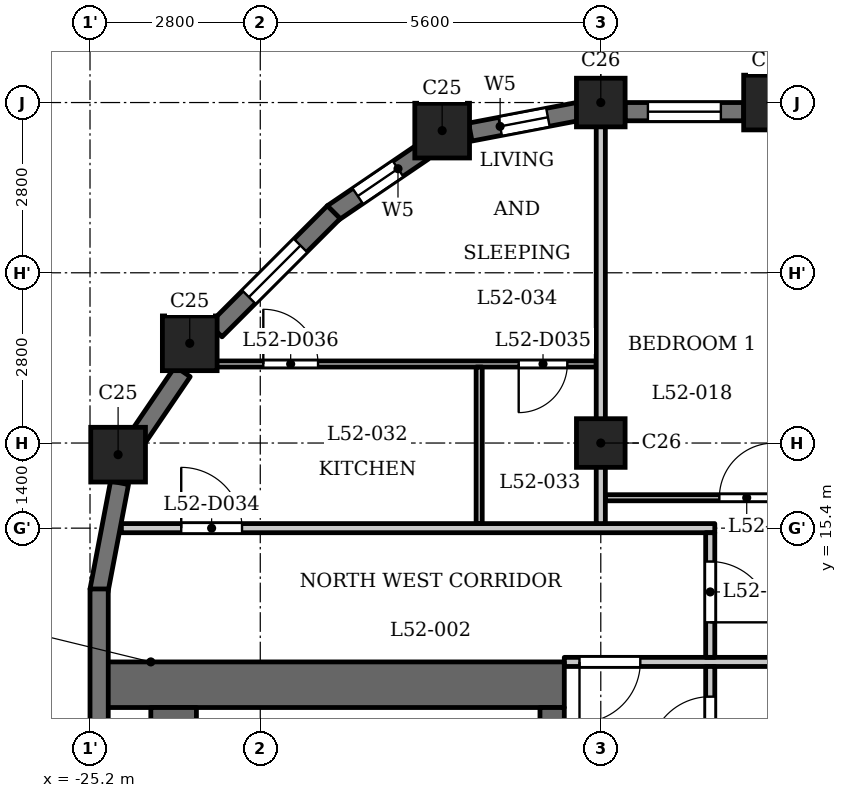
"""IFC4 building model, lengths in metres.
Left out: names, types, materials, properties, quantities, classifications, styles, units other than length and angle.
Written with IfcOpenShell. Run it as: python <this file> out.ifc"""

import sys

from ifc_helpers import new_model, si_unit, direction, frame, frame_2d, origin, origin_2d, place, context, subcontext, project, spatial, rectangle, extrude, element, fill, save


model = new_model("IFC4")
c1 = context("Model", 3, precision=1e-05, world=origin(), true_north=direction((0.0, 1.0)))
c2 = subcontext(c1, "Body", "Model", "MODEL_VIEW")
j1 = project(units=[si_unit("LENGTHUNIT", "METRE"), si_unit("PLANEANGLEUNIT", "RADIAN")], contexts=[c1])
p1 = place(None, origin())
s1 = spatial("IfcSite", under=j1, at=p1, CompositionType="ELEMENT")
p2 = place(p1, origin())
s2 = spatial("IfcBuilding", under=s1, at=p2, CompositionType="ELEMENT")
p3 = place(p2, frame((0.0, 0.0, 202.9)))
s3 = spatial("IfcBuildingStorey", under=s2, at=p3, CompositionType="ELEMENT", Elevation=202.9)
for number, where, z_axis, x_axis in (
    (1, (-14.0, 22.4, 0.0), (0.0, 0.0, 1.0), (1.0, 0.0, 0.0)),
    (2, (-19.409, 21.938, 0.0), (0.0, 0.0, 1.0), (1.0, 0.0, 0.0)),
    (3, (-23.56, 18.44, 0.0), (0.0, 0.0, 1.0), (1.0, 0.0, 0.0)),
    (4, (-24.738, 16.609, 0.0), (0.0, 0.0, 1.0), (1.0, 0.0, 0.0)),
):
    element("IfcColumn", number, at=place(p3, frame(where, z_axis=z_axis, x_axis=x_axis)), inside=s3, PredefinedType="COLUMN", context=c2, shape_type="SweptSolid", body=[
        extrude(rectangle(XDim=0.9, YDim=0.9, at=origin_2d()), origin(), (0.0, 0.0, 1.0), 3.5),
    ])
for number, where, z_axis, x_axis in (
    (5, (-16.8, 16.8, 0.0), (0.0, 0.0, 1.0), (1.0, 0.0, 0.0)),
    (6, (-16.8, 22.4, 0.0), (0.0, 0.0, 1.0), (1.0, 0.0, 0.0)),
):
    element("IfcColumn", number, at=place(p3, frame(where, z_axis=z_axis, x_axis=x_axis)), inside=s3, PredefinedType="COLUMN", context=c2, shape_type="SweptSolid", body=[
        extrude(rectangle(XDim=0.8, YDim=0.8, at=origin_2d()), origin(), (0.0, 0.0, 1.0), 3.5),
    ])
p4 = place(p3, frame((-14.45, 22.25, 0.0), z_axis=(0.0, 0.0, 1.0), x_axis=(-1.0, 0.0, 0.0)))
e7 = element("IfcWall", 7, at=p4, inside=s3, PredefinedType="SOLIDWALL", context=c2, shape_type="SweptSolid", body=[
    extrude(rectangle(XDim=1.95, YDim=0.3, at=frame_2d((0.975, 0.0))), origin(), (0.0, 0.0, 1.0), 2.5),
])
p5 = place(p4, frame((0.375, 0.0, 0.6)))
e8 = element("IfcOpeningElement", 8, at=p5, cuts=e7, PredefinedType="OPENING", context=c2, shape_type="SweptSolid", body=[
    extrude(rectangle(XDim=1.2, YDim=1.55, at=frame_2d((0.6, 0.775))), frame((0.0, 0.16, 0.0), z_axis=(0.0, -1.0, 0.0), x_axis=(1.0, 0.0, 0.0)), (0.0, 0.0, 1.0), 0.32),
])
p6 = place(p3, frame((-17.179, 22.251, 0.0), z_axis=(0.0, 0.0, 1.0), x_axis=(-0.98230529033, -0.187286722942, 0.0)))
e9 = element("IfcWall", 9, at=p6, inside=s3, PredefinedType="SOLIDWALL", context=c2, shape_type="SweptSolid", body=[
    extrude(rectangle(XDim=1.799, YDim=0.3, at=frame_2d((0.899, 0.0))), origin(), (0.0, 0.0, 1.0), 2.5),
])
p7 = place(p6, frame((0.5, 0.0, 0.6)))
e10 = element("IfcOpeningElement", 10, at=p7, cuts=e9, PredefinedType="OPENING", context=c2, shape_type="SweptSolid", body=[
    extrude(rectangle(XDim=0.8, YDim=1.55, at=frame_2d((0.4, 0.775))), frame((0.0, 0.16, 0.0), z_axis=(0.0, -1.0, 0.0), x_axis=(1.0, 0.0, 0.0)), (0.0, 0.0, 1.0), 0.32),
])
p8 = place(p3, frame((-19.719, 21.594, 0.0), z_axis=(0.0, 0.0, 1.0), x_axis=(-0.827067282455, -0.562102935673, 0.0)))
e11 = element("IfcWall", 11, at=p8, inside=s3, PredefinedType="SOLIDWALL", context=c2, shape_type="SweptSolid", body=[
    extrude(rectangle(XDim=1.806, YDim=0.3, at=frame_2d((0.903, 0.0))), origin(), (0.0, 0.0, 1.0), 2.5),
])
p9 = place(p8, frame((0.503, 0.0, 0.6)))
e12 = element("IfcOpeningElement", 12, at=p9, cuts=e11, PredefinedType="OPENING", context=c2, shape_type="SweptSolid", body=[
    extrude(rectangle(XDim=0.8, YDim=1.55, at=frame_2d((0.4, 0.775))), frame((0.0, 0.16, 0.0), z_axis=(0.0, -1.0, 0.0), x_axis=(1.0, 0.0, 0.0)), (0.0, 0.0, 1.0), 0.32),
])
p10 = place(p3, frame((-21.191, 20.597, 0.0), z_axis=(0.0, 0.0, 1.0), x_axis=(-0.707106781187, -0.707106781187, 0.0)))
e13 = element("IfcWall", 13, at=p10, inside=s3, PredefinedType="SOLIDWALL", context=c2, shape_type="SweptSolid", body=[
    extrude(rectangle(XDim=2.75, YDim=0.3, at=frame_2d((1.375, 0.0))), origin(), (0.0, 0.0, 1.0), 2.5),
])
p11 = place(p10, frame((0.775, 0.0, 0.6)))
e14 = element("IfcOpeningElement", 14, at=p11, cuts=e13, PredefinedType="OPENING", context=c2, shape_type="SweptSolid", body=[
    extrude(rectangle(XDim=1.2, YDim=1.55, at=frame_2d((0.6, 0.775))), frame((0.0, 0.16, 0.0), z_axis=(0.0, -1.0, 0.0), x_axis=(1.0, 0.0, 0.0)), (0.0, 0.0, 1.0), 0.32),
])
p12 = place(p3, frame((-23.676, 17.975, 0.0), z_axis=(0.0, 0.0, 1.0), x_axis=(-0.56200149592, -0.827136215253, 0.0)))
e15 = element("IfcWall", 15, at=p12, inside=s3, PredefinedType="SOLIDWALL", context=c2, shape_type="SweptSolid", body=[
    extrude(rectangle(XDim=1.277, YDim=0.3, at=frame_2d((0.639, 0.0))), origin(), (0.0, 0.0, 1.0), 2.5),
])
p13 = place(p3, frame((-24.714, 16.146, 0.0), z_axis=(0.0, 0.0, 1.0), x_axis=(-0.187348135549, -0.982293579388, 0.0)))
e16 = element("IfcWall", 16, at=p13, inside=s3, PredefinedType="SOLIDWALL", context=c2, shape_type="SweptSolid", body=[
    extrude(rectangle(XDim=1.806, YDim=0.3, at=frame_2d((0.903, 0.0))), origin(), (0.0, 0.0, 1.0), 2.5),
])
p14 = place(p3, frame((-25.05, 14.4, 0.0), z_axis=(0.0, 0.0, 1.0), x_axis=(0.0, -1.0, 0.0)))
e17 = element("IfcWall", 17, at=p14, inside=s3, PredefinedType="SOLIDWALL", context=c2, shape_type="SweptSolid", body=[
    extrude(rectangle(XDim=2.75, YDim=0.3, at=frame_2d((1.375, 0.0))), origin(), (0.0, 0.0, 1.0), 2.5),
])
p15 = place(p3, frame((-17.4, 12.825, 0.0), z_axis=(0.0, 0.0, 1.0), x_axis=(-1.0, 0.0, 0.0)))
e18 = element("IfcWall", 18, at=p15, inside=s3, PredefinedType="SHEAR", context=c2, shape_type="SweptSolid", body=[
    extrude(rectangle(XDim=7.6, YDim=0.75, at=frame_2d((3.8, 0.0))), origin(), (0.0, 0.0, 1.0), 3.2),
])
p16 = place(p3, frame((-17.6, -12.45, 0.0), z_axis=(0.0, 0.0, 1.0), x_axis=(0.0, 1.0, 0.0)))
e19 = element("IfcWall", 19, at=p16, inside=s3, PredefinedType="SHEAR", context=c2, shape_type="SweptSolid", body=[
    extrude(rectangle(XDim=24.9, YDim=0.4, at=frame_2d((12.45, 0.0))), origin(), (0.0, 0.0, 1.0), 3.2),
])
p17 = place(p16, frame((8.65, 0.0, 0.0)))
e20 = element("IfcOpeningElement", 20, at=p17, cuts=e19, PredefinedType="OPENING", context=c2, shape_type="SweptSolid", body=[
    extrude(rectangle(XDim=0.9, YDim=2.1, at=frame_2d((0.45, 1.05))), frame((0.0, 0.21, 0.0), z_axis=(0.0, -1.0, 0.0), x_axis=(1.0, 0.0, 0.0)), (0.0, 0.0, 1.0), 0.42),
])
p18 = place(p16, frame((15.6, 0.0, 0.0)))
e21 = element("IfcOpeningElement", 21, at=p18, cuts=e19, PredefinedType="OPENING", context=c2, shape_type="SweptSolid", body=[
    extrude(rectangle(XDim=1.1, YDim=2.1, at=frame_2d((0.55, 1.05))), frame((0.0, 0.21, 0.0), z_axis=(0.0, -1.0, 0.0), x_axis=(1.0, 0.0, 0.0)), (0.0, 0.0, 1.0), 0.42),
])
p19 = place(p16, frame((18.0, 0.0, 0.0)))
e22 = element("IfcOpeningElement", 22, at=p19, cuts=e19, PredefinedType="OPENING", context=c2, shape_type="SweptSolid", body=[
    extrude(rectangle(XDim=1.1, YDim=2.1, at=frame_2d((0.55, 1.05))), frame((0.0, 0.21, 0.0), z_axis=(0.0, -1.0, 0.0), x_axis=(1.0, 0.0, 0.0)), (0.0, 0.0, 1.0), 0.42),
])
p20 = place(p16, frame((23.025, 0.0, 0.0)))
e23 = element("IfcOpeningElement", 23, at=p20, cuts=e19, PredefinedType="OPENING", context=c2, shape_type="SweptSolid", body=[
    extrude(rectangle(XDim=1.1, YDim=2.1, at=frame_2d((0.55, 1.05))), frame((0.0, 0.21, 0.0), z_axis=(0.0, -1.0, 0.0), x_axis=(1.0, 0.0, 0.0)), (0.0, 0.0, 1.0), 0.42),
])
p21 = place(p16, frame((0.775, 0.0, 0.0)))
e24 = element("IfcOpeningElement", 24, at=p21, cuts=e19, PredefinedType="OPENING", context=c2, shape_type="SweptSolid", body=[
    extrude(rectangle(XDim=1.1, YDim=2.1, at=frame_2d((0.55, 1.05))), frame((0.0, 0.21, 0.0), z_axis=(0.0, -1.0, 0.0), x_axis=(1.0, 0.0, 0.0)), (0.0, 0.0, 1.0), 0.42),
])
p22 = place(p16, frame((12.925, 0.0, 0.0)))
e25 = element("IfcOpeningElement", 25, at=p22, cuts=e19, PredefinedType="OPENING", context=c2, shape_type="SweptSolid", body=[
    extrude(rectangle(XDim=1.8, YDim=2.1, at=frame_2d((0.9, 1.05))), frame((0.0, 0.21, 0.0), z_axis=(0.0, -1.0, 0.0), x_axis=(1.0, 0.0, 0.0)), (0.0, 0.0, 1.0), 0.42),
])
p23 = place(p3, frame((-23.825, -12.45, 0.0), z_axis=(0.0, 0.0, 1.0), x_axis=(0.0, 1.0, 0.0)))
e26 = element("IfcWall", 26, at=p23, inside=s3, PredefinedType="SHEAR", context=c2, shape_type="SweptSolid", body=[
    extrude(rectangle(XDim=24.9, YDim=0.75, at=frame_2d((12.45, 0.0))), origin(), (0.0, 0.0, 1.0), 3.2),
])
p24 = place(p3, frame((-17.4, 13.2, 0.0), z_axis=(0.0, 0.0, 1.0), x_axis=(1.0, 0.0, 0.0)))
e27 = element("IfcWall", 27, at=p24, inside=s3, PredefinedType="PARTITIONING", context=c2, shape_type="SweptSolid", body=[
    extrude(rectangle(XDim=34.8, YDim=0.15, at=frame_2d((17.4, 0.0))), origin(), (0.0, 0.0, 1.0), 3.2),
])
p25 = place(p24, frame((0.25, 0.0, 0.0)))
e28 = element("IfcOpeningElement", 28, at=p25, cuts=e27, PredefinedType="OPENING", context=c2, shape_type="SweptSolid", body=[
    extrude(rectangle(XDim=1.0, YDim=2.1, at=frame_2d((0.5, 1.05))), frame((0.0, 0.085, 0.0), z_axis=(0.0, -1.0, 0.0), x_axis=(1.0, 0.0, 0.0)), (0.0, 0.0, 1.0), 0.17),
])
p26 = place(p24, frame((33.65, 0.0, 0.0)))
e29 = element("IfcOpeningElement", 29, at=p26, cuts=e27, PredefinedType="OPENING", context=c2, shape_type="SweptSolid", body=[
    extrude(rectangle(XDim=1.0, YDim=2.1, at=frame_2d((0.5, 1.05))), frame((0.0, 0.085, 0.0), z_axis=(0.0, -1.0, 0.0), x_axis=(1.0, 0.0, 0.0)), (0.0, 0.0, 1.0), 0.17),
])
p27 = place(p3, frame((-24.684, 15.4, 0.0), z_axis=(0.0, 0.0, 1.0), x_axis=(1.0, 0.0, 0.0)))
e30 = element("IfcWall", 30, at=p27, inside=s3, PredefinedType="PARTITIONING", context=c2, shape_type="SweptSolid", body=[
    extrude(rectangle(XDim=9.759, YDim=0.15, at=frame_2d((4.879, 0.0))), origin(), (0.0, 0.0, 1.0), 3.2),
])
p28 = place(p27, frame((0.984, 0.0, 0.0)))
e31 = element("IfcOpeningElement", 31, at=p28, cuts=e30, PredefinedType="OPENING", context=c2, shape_type="SweptSolid", body=[
    extrude(rectangle(XDim=1.0, YDim=2.1, at=frame_2d((0.5, 1.05))), frame((0.0, 0.085, 0.0), z_axis=(0.0, -1.0, 0.0), x_axis=(1.0, 0.0, 0.0)), (0.0, 0.0, 1.0), 0.17),
])
p29 = place(p3, frame((-16.725, 15.9, 0.0), z_axis=(0.0, 0.0, 1.0), x_axis=(1.0, 0.0, 0.0)))
e32 = element("IfcWall", 32, at=p29, inside=s3, PredefinedType="PARTITIONING", context=c2, shape_type="SweptSolid", body=[
    extrude(rectangle(XDim=33.45, YDim=0.1, at=frame_2d((16.725, 0.0))), origin(), (0.0, 0.0, 1.0), 3.2),
])
p30 = place(p29, frame((1.875, 0.0, 0.0)))
e33 = element("IfcOpeningElement", 33, at=p30, cuts=e32, PredefinedType="OPENING", context=c2, shape_type="SweptSolid", body=[
    extrude(rectangle(XDim=0.9, YDim=2.1, at=frame_2d((0.45, 1.05))), frame((0.0, 0.06, 0.0), z_axis=(0.0, -1.0, 0.0), x_axis=(1.0, 0.0, 0.0)), (0.0, 0.0, 1.0), 0.12),
])
p31 = place(p29, frame((3.975, 0.0, 0.0)))
e34 = element("IfcOpeningElement", 34, at=p31, cuts=e32, PredefinedType="OPENING", context=c2, shape_type="SweptSolid", body=[
    extrude(rectangle(XDim=0.9, YDim=2.1, at=frame_2d((0.45, 1.05))), frame((0.0, 0.06, 0.0), z_axis=(0.0, -1.0, 0.0), x_axis=(1.0, 0.0, 0.0)), (0.0, 0.0, 1.0), 0.12),
])
p32 = place(p29, frame((6.825, 0.0, 0.0)))
e35 = element("IfcOpeningElement", 35, at=p32, cuts=e32, PredefinedType="OPENING", context=c2, shape_type="SweptSolid", body=[
    extrude(rectangle(XDim=0.9, YDim=2.1, at=frame_2d((0.45, 1.05))), frame((0.0, 0.06, 0.0), z_axis=(0.0, -1.0, 0.0), x_axis=(1.0, 0.0, 0.0)), (0.0, 0.0, 1.0), 0.12),
])
p33 = place(p29, frame((28.975, 0.0, 0.0)))
e36 = element("IfcOpeningElement", 36, at=p33, cuts=e32, PredefinedType="OPENING", context=c2, shape_type="SweptSolid", body=[
    extrude(rectangle(XDim=0.9, YDim=2.1, at=frame_2d((0.45, 1.05))), frame((0.0, 0.06, 0.0), z_axis=(0.0, -1.0, 0.0), x_axis=(1.0, 0.0, 0.0)), (0.0, 0.0, 1.0), 0.12),
])
p34 = place(p29, frame((30.725, 0.0, 0.0)))
e37 = element("IfcOpeningElement", 37, at=p34, cuts=e32, PredefinedType="OPENING", context=c2, shape_type="SweptSolid", body=[
    extrude(rectangle(XDim=0.9, YDim=2.1, at=frame_2d((0.45, 1.05))), frame((0.0, 0.06, 0.0), z_axis=(0.0, -1.0, 0.0), x_axis=(1.0, 0.0, 0.0)), (0.0, 0.0, 1.0), 0.12),
])
p35 = place(p29, frame((25.625, 0.0, 0.0)))
e38 = element("IfcOpeningElement", 38, at=p35, cuts=e32, PredefinedType="OPENING", context=c2, shape_type="SweptSolid", body=[
    extrude(rectangle(XDim=0.9, YDim=2.1, at=frame_2d((0.45, 1.05))), frame((0.0, 0.06, 0.0), z_axis=(0.0, -1.0, 0.0), x_axis=(1.0, 0.0, 0.0)), (0.0, 0.0, 1.0), 0.12),
])
p36 = place(p3, frame((-23.64, 18.1, 0.0), z_axis=(0.0, 0.0, 1.0), x_axis=(1.0, 0.0, 0.0)))
e39 = element("IfcWall", 39, at=p36, inside=s3, PredefinedType="PARTITIONING", context=c2, shape_type="SweptSolid", body=[
    extrude(rectangle(XDim=6.765, YDim=0.1, at=frame_2d((3.382, 0.0))), origin(), (0.0, 0.0, 1.0), 3.2),
])
p37 = place(p36, frame((5.49, 0.0, 0.0)))
e40 = element("IfcOpeningElement", 40, at=p37, cuts=e39, PredefinedType="OPENING", context=c2, shape_type="SweptSolid", body=[
    extrude(rectangle(XDim=0.8, YDim=2.1, at=frame_2d((0.4, 1.05))), frame((0.0, 0.06, 0.0), z_axis=(0.0, -1.0, 0.0), x_axis=(1.0, 0.0, 0.0)), (0.0, 0.0, 1.0), 0.12),
])
p38 = place(p36, frame((1.29, 0.0, 0.0)))
e41 = element("IfcOpeningElement", 41, at=p38, cuts=e39, PredefinedType="OPENING", context=c2, shape_type="SweptSolid", body=[
    extrude(rectangle(XDim=0.9, YDim=2.1, at=frame_2d((0.45, 1.05))), frame((0.0, 0.06, 0.0), z_axis=(0.0, -1.0, 0.0), x_axis=(1.0, 0.0, 0.0)), (0.0, 0.0, 1.0), 0.12),
])
p39 = place(p3, frame((-18.8, 15.475, 0.0), z_axis=(0.0, 0.0, 1.0), x_axis=(0.0, 1.0, 0.0)))
e42 = element("IfcWall", 42, at=p39, inside=s3, PredefinedType="PARTITIONING", context=c2, shape_type="SweptSolid", body=[
    extrude(rectangle(XDim=2.575, YDim=0.1, at=frame_2d((1.288, 0.0))), origin(), (0.0, 0.0, 1.0), 3.2),
])
p40 = place(p3, frame((-16.8, 15.475, 0.0), z_axis=(0.0, 0.0, 1.0), x_axis=(0.0, 1.0, 0.0)))
e43 = element("IfcWall", 43, at=p40, inside=s3, PredefinedType="PARTITIONING", context=c2, shape_type="SweptSolid", body=[
    extrude(rectangle(XDim=6.835, YDim=0.15, at=frame_2d((3.417, 0.0))), origin(), (0.0, 0.0, 1.0), 2.55),
])
p41 = place(p3, frame((-15.0, 6.769, 0.0), z_axis=(0.0, 0.0, 1.0), x_axis=(0.0, 1.0, 0.0)))
e44 = element("IfcWall", 44, at=p41, inside=s3, PredefinedType="PARTITIONING", context=c2, shape_type="SweptSolid", body=[
    extrude(rectangle(XDim=6.356, YDim=0.15, at=frame_2d((3.178, 0.0))), origin(), (0.0, 0.0, 1.0), 3.2),
])
p42 = place(p41, frame((4.86, 0.0, 0.0)))
e45 = element("IfcOpeningElement", 45, at=p42, cuts=e44, PredefinedType="OPENING", context=c2, shape_type="SweptSolid", body=[
    extrude(rectangle(XDim=1.0, YDim=2.1, at=frame_2d((0.5, 1.05))), frame((0.0, 0.085, 0.0), z_axis=(0.0, -1.0, 0.0), x_axis=(1.0, 0.0, 0.0)), (0.0, 0.0, 1.0), 0.17),
])
p43 = place(p3, frame((-15.0, 13.275, 0.0), z_axis=(0.0, 0.0, 1.0), x_axis=(0.0, 1.0, 0.0)))
e46 = element("IfcWall", 46, at=p43, inside=s3, PredefinedType="PARTITIONING", context=c2, shape_type="SweptSolid", body=[
    extrude(rectangle(XDim=2.05, YDim=0.15, at=frame_2d((1.025, 0.0))), origin(), (0.0, 0.0, 1.0), 3.2),
])
p44 = place(p43, frame((0.576, 0.0, 0.0)))
e47 = element("IfcOpeningElement", 47, at=p44, cuts=e46, PredefinedType="OPENING", context=c2, shape_type="SweptSolid", body=[
    extrude(rectangle(XDim=1.0, YDim=2.1, at=frame_2d((0.5, 1.05))), frame((0.0, 0.085, 0.0), z_axis=(0.0, -1.0, 0.0), x_axis=(1.0, 0.0, 0.0)), (0.0, 0.0, 1.0), 0.17),
])
p45 = place(p42, origin())
e48 = element("IfcDoor", 48, at=p45, inside=s3, OperationType="SINGLE_SWING_RIGHT", PredefinedType="DOOR", context=c2, shape_type="SweptSolid", body=[
    extrude(rectangle(XDim=1.0, YDim=2.1, at=frame_2d((0.5, 1.05))), frame((0.0, 0.025, 0.0), z_axis=(0.0, -1.0, 0.0), x_axis=(1.0, 0.0, 0.0)), (0.0, 0.0, 1.0), 0.05),
])
fill(e45, e48)
p46 = place(p25, origin())
e49 = element("IfcDoor", 49, at=p46, inside=s3, OperationType="SINGLE_SWING_LEFT", PredefinedType="DOOR", context=c2, shape_type="SweptSolid", body=[
    extrude(rectangle(XDim=1.0, YDim=2.1, at=frame_2d((0.5, 1.05))), frame((0.0, 0.025, 0.0), z_axis=(0.0, -1.0, 0.0), x_axis=(1.0, 0.0, 0.0)), (0.0, 0.0, 1.0), 0.05),
])
fill(e28, e49)
p47 = place(p44, origin())
e50 = element("IfcDoor", 50, at=p47, inside=s3, OperationType="SINGLE_SWING_LEFT", PredefinedType="DOOR", context=c2, shape_type="SweptSolid", body=[
    extrude(rectangle(XDim=1.0, YDim=2.1, at=frame_2d((0.5, 1.05))), frame((0.0, 0.025, 0.0), z_axis=(0.0, -1.0, 0.0), x_axis=(1.0, 0.0, 0.0)), (0.0, 0.0, 1.0), 0.05),
])
fill(e47, e50)
p48 = place(p30, origin())
e51 = element("IfcDoor", 51, at=p48, inside=s3, OperationType="SINGLE_SWING_LEFT", PredefinedType="DOOR", context=c2, shape_type="SweptSolid", body=[
    extrude(rectangle(XDim=0.9, YDim=2.1, at=frame_2d((0.45, 1.05))), frame((0.0, 0.025, 0.0), z_axis=(0.0, -1.0, 0.0), x_axis=(1.0, 0.0, 0.0)), (0.0, 0.0, 1.0), 0.05),
])
fill(e33, e51)
p49 = place(p28, origin())
e52 = element("IfcDoor", 52, at=p49, inside=s3, OperationType="SINGLE_SWING_RIGHT", PredefinedType="DOOR", context=c2, shape_type="SweptSolid", body=[
    extrude(rectangle(XDim=1.0, YDim=2.1, at=frame_2d((0.5, 1.05))), frame((0.0, 0.025, 0.0), z_axis=(0.0, -1.0, 0.0), x_axis=(1.0, 0.0, 0.0)), (0.0, 0.0, 1.0), 0.05),
])
fill(e31, e52)
p50 = place(p37, origin())
e53 = element("IfcDoor", 53, at=p50, inside=s3, OperationType="SINGLE_SWING_LEFT", PredefinedType="DOOR", context=c2, shape_type="SweptSolid", body=[
    extrude(rectangle(XDim=0.8, YDim=2.1, at=frame_2d((0.4, 1.05))), frame((0.0, 0.025, 0.0), z_axis=(0.0, -1.0, 0.0), x_axis=(1.0, 0.0, 0.0)), (0.0, 0.0, 1.0), 0.05),
])
fill(e40, e53)
p51 = place(p38, origin())
e54 = element("IfcDoor", 54, at=p51, inside=s3, OperationType="SINGLE_SWING_RIGHT", PredefinedType="DOOR", context=c2, shape_type="SweptSolid", body=[
    extrude(rectangle(XDim=0.9, YDim=2.1, at=frame_2d((0.45, 1.05))), frame((0.0, 0.025, 0.0), z_axis=(0.0, -1.0, 0.0), x_axis=(1.0, 0.0, 0.0)), (0.0, 0.0, 1.0), 0.05),
])
fill(e41, e54)
p52 = place(p5, origin())
e55 = element("IfcWindow", 55, at=p52, inside=s3, PartitioningType="SINGLE_PANEL", PredefinedType="WINDOW", context=c2, shape_type="SweptSolid", body=[
    extrude(rectangle(XDim=1.2, YDim=1.55, at=frame_2d((0.6, 0.775))), frame((0.0, 0.03, 0.0), z_axis=(0.0, -1.0, 0.0), x_axis=(1.0, 0.0, 0.0)), (0.0, 0.0, 1.0), 0.06),
])
fill(e8, e55)
p53 = place(p7, origin())
e56 = element("IfcWindow", 56, at=p53, inside=s3, PartitioningType="SINGLE_PANEL", PredefinedType="WINDOW", context=c2, shape_type="SweptSolid", body=[
    extrude(rectangle(XDim=0.8, YDim=1.55, at=frame_2d((0.4, 0.775))), frame((0.0, 0.03, 0.0), z_axis=(0.0, -1.0, 0.0), x_axis=(1.0, 0.0, 0.0)), (0.0, 0.0, 1.0), 0.06),
])
fill(e10, e56)
p54 = place(p9, origin())
e57 = element("IfcWindow", 57, at=p54, inside=s3, PartitioningType="SINGLE_PANEL", PredefinedType="WINDOW", context=c2, shape_type="SweptSolid", body=[
    extrude(rectangle(XDim=0.8, YDim=1.55, at=frame_2d((0.4, 0.775))), frame((0.0, 0.03, 0.0), z_axis=(0.0, -1.0, 0.0), x_axis=(1.0, 0.0, 0.0)), (0.0, 0.0, 1.0), 0.06),
])
fill(e12, e57)
p55 = place(p11, origin())
e58 = element("IfcWindow", 58, at=p55, inside=s3, PartitioningType="SINGLE_PANEL", PredefinedType="WINDOW", context=c2, shape_type="SweptSolid", body=[
    extrude(rectangle(XDim=1.2, YDim=1.55, at=frame_2d((0.6, 0.775))), frame((0.0, 0.03, 0.0), z_axis=(0.0, -1.0, 0.0), x_axis=(1.0, 0.0, 0.0)), (0.0, 0.0, 1.0), 0.06),
])
fill(e14, e58)
save(model, sys.argv[1])
